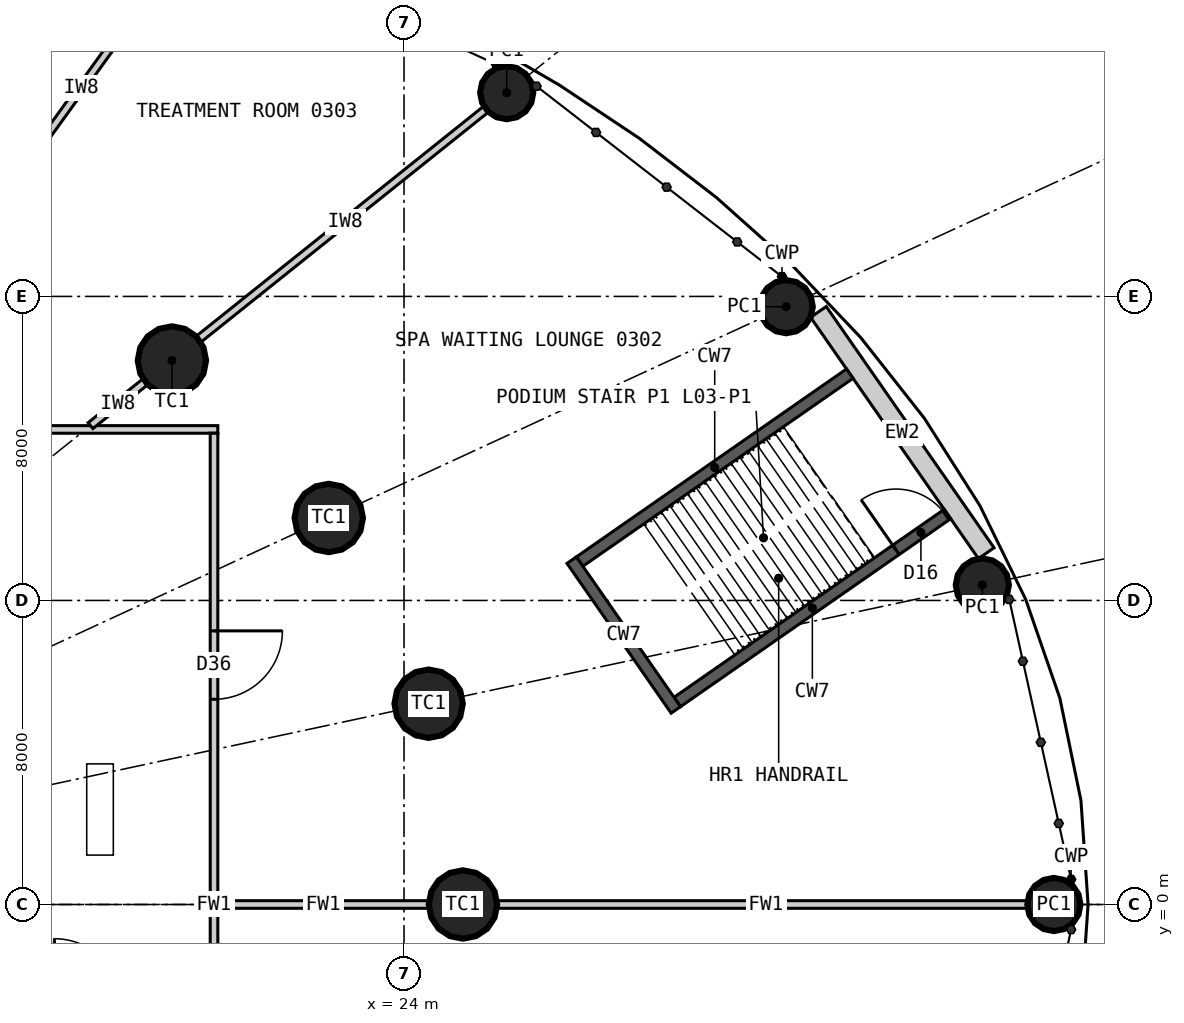
"""IFC4 building model, lengths in metres.
Left out: names, types, materials, properties, quantities, classifications, styles, units other than length and angle.
Written with IfcOpenShell. Run it as: python <this file> out.ifc"""

import sys

from ifc_helpers import new_model, si_unit, direction, frame, frame_2d, origin, origin_2d, place, context, subcontext, project, spatial, rectangle, circle, extrude, element, fill, save


model = new_model("IFC4")
c1 = context("Model", 3, precision=1e-05, world=origin(), true_north=direction((0.0, 1.0)))
c2 = subcontext(c1, "Body", "Model", "MODEL_VIEW")
j1 = project(units=[si_unit("LENGTHUNIT", "METRE"), si_unit("PLANEANGLEUNIT", "RADIAN")], contexts=[c1])
p1 = place(None, origin())
s1 = spatial("IfcSite", under=j1, at=p1, CompositionType="ELEMENT")
p2 = place(p1, origin())
s2 = spatial("IfcBuilding", under=s1, at=p2, CompositionType="ELEMENT")
p3 = place(p2, frame((0.0, 0.0, 19.2)))
s3 = spatial("IfcBuildingStorey", under=s2, at=p3, CompositionType="ELEMENT", Elevation=19.2)
for number, where, z_axis, x_axis in (
    (1, (25.55, 0.0, 0.0), (0.0, 0.0, 1.0), (1.0, 0.0, 0.0)),
    (2, (24.647, 5.283, 0.0), (0.0, 0.0, 1.0), (1.0, 0.0, 0.0)),
    (3, (22.019, 10.17, 0.0), (0.0, 0.0, 1.0), (1.0, 0.0, 0.0)),
    (4, (17.892, 14.313, 0.0), (0.0, 0.0, 1.0), (1.0, 0.0, 0.0)),
):
    element("IfcColumn", number, at=place(p3, frame(where, z_axis=z_axis, x_axis=x_axis)), inside=s3, PredefinedType="COLUMN", context=c2, shape_type="SweptSolid", body=[
        extrude(circle(Radius=0.9, at=origin_2d()), origin(), (0.0, 0.0, 1.0), 5.4),
    ])
for number, where, z_axis, x_axis in (
    (5, (41.1, 0.0, 0.0), (0.0, 0.0, 1.0), (1.0, 0.0, 0.0)),
    (6, (39.218, 8.407, 0.0), (0.0, 0.0, 1.0), (1.0, 0.0, 0.0)),
    (7, (34.057, 15.73, 0.0), (0.0, 0.0, 1.0), (1.0, 0.0, 0.0)),
    (8, (26.702, 21.362, 0.0), (0.0, 0.0, 1.0), (1.0, 0.0, 0.0)),
):
    element("IfcColumn", number, at=place(p3, frame(where, z_axis=z_axis, x_axis=x_axis)), inside=s3, PredefinedType="COLUMN", context=c2, shape_type="SweptSolid", body=[
        extrude(circle(Radius=0.7, at=origin_2d()), origin(), (0.0, 0.0, 1.0), 5.4),
    ])
p4 = place(p3, frame((39.32, 9.244, 0.0), z_axis=(0.0, 0.0, 1.0), x_axis=(-0.571029335057, 0.820929655028, 0.0)))
e9 = element("IfcWall", 9, at=p4, inside=s3, PredefinedType="SOLIDWALL", context=c2, shape_type="SweptSolid", body=[
    extrude(rectangle(XDim=7.733, YDim=0.5, at=frame_2d((3.866, 0.0))), origin(), (0.0, 0.0, 1.0), 5.15),
])
p5 = place(p3, frame((-19.1, 12.5, 0.0), z_axis=(0.0, 0.0, 1.0), x_axis=(1.0, 0.0, 0.0)))
e10 = element("IfcWall", 10, at=p5, inside=s3, PredefinedType="PARTITIONING", context=c2, shape_type="SweptSolid", body=[
    extrude(rectangle(XDim=38.2, YDim=0.2, at=frame_2d((19.1, 0.0))), origin(), (0.0, 0.0, 1.0), 5.15),
])
p6 = place(p5, frame((31.022, 0.0, 0.0)))
e11 = element("IfcOpeningElement", 11, at=p6, cuts=e10, PredefinedType="OPENING", context=c2, shape_type="SweptSolid", body=[
    extrude(rectangle(XDim=1.0, YDim=2.2, at=frame_2d((0.5, 1.1))), frame((0.0, 0.11, 0.0), z_axis=(0.0, -1.0, 0.0), x_axis=(1.0, 0.0, 0.0)), (0.0, 0.0, 1.0), 0.22),
])
p7 = place(p5, frame((25.257, 0.0, 0.0)))
e12 = element("IfcOpeningElement", 12, at=p7, cuts=e10, PredefinedType="OPENING", context=c2, shape_type="SweptSolid", body=[
    extrude(rectangle(XDim=1.0, YDim=2.2, at=frame_2d((0.5, 1.1))), frame((0.0, 0.11, 0.0), z_axis=(0.0, -1.0, 0.0), x_axis=(1.0, 0.0, 0.0)), (0.0, 0.0, 1.0), 0.22),
])
p8 = place(p5, frame((20.71, 0.0, 0.0)))
e13 = element("IfcOpeningElement", 13, at=p8, cuts=e10, PredefinedType="OPENING", context=c2, shape_type="SweptSolid", body=[
    extrude(rectangle(XDim=1.0, YDim=2.1, at=frame_2d((0.5, 1.05))), frame((0.0, 0.11, 0.0), z_axis=(0.0, -1.0, 0.0), x_axis=(1.0, 0.0, 0.0)), (0.0, 0.0, 1.0), 0.22),
])
p9 = place(p5, frame((16.49, 0.0, 0.0)))
e14 = element("IfcOpeningElement", 14, at=p9, cuts=e10, PredefinedType="OPENING", context=c2, shape_type="SweptSolid", body=[
    extrude(rectangle(XDim=1.0, YDim=2.1, at=frame_2d((0.5, 1.05))), frame((0.0, 0.11, 0.0), z_axis=(0.0, -1.0, 0.0), x_axis=(1.0, 0.0, 0.0)), (0.0, 0.0, 1.0), 0.22),
])
p10 = place(p5, frame((11.943, 0.0, 0.0)))
e15 = element("IfcOpeningElement", 15, at=p10, cuts=e10, PredefinedType="OPENING", context=c2, shape_type="SweptSolid", body=[
    extrude(rectangle(XDim=1.0, YDim=2.2, at=frame_2d((0.5, 1.1))), frame((0.0, 0.11, 0.0), z_axis=(0.0, -1.0, 0.0), x_axis=(1.0, 0.0, 0.0)), (0.0, 0.0, 1.0), 0.22),
])
p11 = place(p5, frame((6.178, 0.0, 0.0)))
e16 = element("IfcOpeningElement", 16, at=p11, cuts=e10, PredefinedType="OPENING", context=c2, shape_type="SweptSolid", body=[
    extrude(rectangle(XDim=1.0, YDim=2.2, at=frame_2d((0.5, 1.1))), frame((0.0, 0.11, 0.0), z_axis=(0.0, -1.0, 0.0), x_axis=(1.0, 0.0, 0.0)), (0.0, 0.0, 1.0), 0.22),
])
p12 = place(p3, frame((19.0, -12.4, 0.0), z_axis=(0.0, 0.0, 1.0), x_axis=(0.0, 1.0, 0.0)))
e17 = element("IfcWall", 17, at=p12, inside=s3, PredefinedType="PARTITIONING", context=c2, shape_type="SweptSolid", body=[
    extrude(rectangle(XDim=24.8, YDim=0.2, at=frame_2d((12.4, 0.0))), origin(), (0.0, 0.0, 1.0), 5.15),
])
p13 = place(p12, frame((17.8, 0.0, 0.0)))
e18 = element("IfcOpeningElement", 18, at=p13, cuts=e17, PredefinedType="OPENING", context=c2, shape_type="SweptSolid", body=[
    extrude(rectangle(XDim=1.8, YDim=2.4, at=frame_2d((0.9, 1.2))), frame((0.0, 0.11, 0.0), z_axis=(0.0, -1.0, 0.0), x_axis=(1.0, 0.0, 0.0)), (0.0, 0.0, 1.0), 0.22),
])
p14 = place(p3, frame((19.1, 0.0, 0.0), z_axis=(0.0, 0.0, 1.0), x_axis=(1.0, 0.0, 0.0)))
e19 = element("IfcWall", 19, at=p14, inside=s3, PredefinedType="PARTITIONING", context=c2, shape_type="SweptSolid", body=[
    extrude(rectangle(XDim=5.55, YDim=0.2, at=frame_2d((2.775, 0.0))), origin(), (0.0, 0.0, 1.0), 4.25),
])
p15 = place(p3, frame((26.45, 0.0, 0.0), z_axis=(0.0, 0.0, 1.0), x_axis=(1.0, 0.0, 0.0)))
e20 = element("IfcWall", 20, at=p15, inside=s3, PredefinedType="PARTITIONING", context=c2, shape_type="SweptSolid", body=[
    extrude(rectangle(XDim=14.15, YDim=0.2, at=frame_2d((7.075, 0.0))), origin(), (0.0, 0.0, 1.0), 4.25),
])
p16 = place(p3, frame((15.75, 12.6, 0.0), z_axis=(0.0, 0.0, 1.0), x_axis=(0.780881734892, 0.6246788904, 0.0)))
e21 = element("IfcWall", 21, at=p16, inside=s3, PredefinedType="PARTITIONING", context=c2, shape_type="SweptSolid", body=[
    extrude(rectangle(XDim=1.843, YDim=0.2, at=frame_2d((0.921, 0.0))), origin(), (0.0, 0.0, 1.0), 4.3),
])
p17 = place(p3, frame((18.594, 14.875, 0.0), z_axis=(0.0, 0.0, 1.0), x_axis=(0.780868809443, 0.624695047554, 0.0)))
e22 = element("IfcWall", 22, at=p17, inside=s3, PredefinedType="PARTITIONING", context=c2, shape_type="SweptSolid", body=[
    extrude(rectangle(XDim=9.883, YDim=0.2, at=frame_2d((4.941, 0.0))), origin(), (0.0, 0.0, 1.0), 4.25),
])
p18 = place(p3, frame((13.118, 18.176, 0.0), z_axis=(0.0, 0.0, 1.0), x_axis=(0.585204349301, 0.810885854828, 0.0)))
e23 = element("IfcWall", 23, at=p18, inside=s3, PredefinedType="PARTITIONING", context=c2, shape_type="SweptSolid", body=[
    extrude(rectangle(XDim=8.161, YDim=0.2, at=frame_2d((4.081, 0.0))), origin(), (0.0, 0.0, 1.0), 4.25),
])
p19 = place(p3, frame((38.299, 10.274, 0.0), z_axis=(0.0, 0.0, 1.0), x_axis=(-0.820936803751, -0.571019057692, 0.0)))
e24 = element("IfcWall", 24, at=p19, inside=s3, PredefinedType="SHEAR", context=c2, shape_type="SweptSolid", body=[
    extrude(rectangle(XDim=8.66, YDim=0.3, at=frame_2d((4.33, 0.0))), origin(), (0.0, 0.0, 1.0), 5.4),
])
p20 = place(p19, frame((0.05, 0.0, 0.0)))
e25 = element("IfcOpeningElement", 25, at=p20, cuts=e24, PredefinedType="OPENING", context=c2, shape_type="SweptSolid", body=[
    extrude(rectangle(XDim=1.6, YDim=2.1, at=frame_2d((0.8, 1.05))), frame((0.0, 0.16, 0.0), z_axis=(0.0, -1.0, 0.0), x_axis=(1.0, 0.0, 0.0)), (0.0, 0.0, 1.0), 0.32),
])
p21 = place(p3, frame((35.729, 13.968, 0.0), z_axis=(0.0, 0.0, 1.0), x_axis=(-0.82092761123, -0.571032273274, 0.0)))
e26 = element("IfcWall", 26, at=p21, inside=s3, PredefinedType="SHEAR", context=c2, shape_type="SweptSolid", body=[
    extrude(rectangle(XDim=8.66, YDim=0.3, at=frame_2d((4.33, 0.0))), origin(), (0.0, 0.0, 1.0), 5.4),
])
p22 = place(p3, frame((31.153, 5.12, 0.0), z_axis=(0.0, 0.0, 1.0), x_axis=(-0.571036173178, 0.820924898467, 0.0)))
e27 = element("IfcWall", 27, at=p22, inside=s3, PredefinedType="SHEAR", context=c2, shape_type="SweptSolid", body=[
    extrude(rectangle(XDim=4.8, YDim=0.3, at=frame_2d((2.4, 0.0))), origin(), (0.0, 0.0, 1.0), 5.4),
])
p23 = place(p20, origin())
e28 = element("IfcDoor", 28, at=p23, inside=s3, OperationType="SINGLE_SWING_RIGHT", PredefinedType="DOOR", context=c2, shape_type="SweptSolid", body=[
    extrude(rectangle(XDim=1.6, YDim=2.1, at=frame_2d((0.8, 1.05))), frame((0.0, 0.025, 0.0), z_axis=(0.0, -1.0, 0.0), x_axis=(1.0, 0.0, 0.0)), (0.0, 0.0, 1.0), 0.05),
])
fill(e25, e28)
p24 = place(p13, origin())
e29 = element("IfcDoor", 29, at=p24, inside=s3, OperationType="DOUBLE_DOOR_DOUBLE_SWING", PredefinedType="DOOR", context=c2, shape_type="SweptSolid", body=[
    extrude(rectangle(XDim=1.8, YDim=2.4, at=frame_2d((0.9, 1.2))), frame((0.0, 0.025, 0.0), z_axis=(0.0, -1.0, 0.0), x_axis=(1.0, 0.0, 0.0)), (0.0, 0.0, 1.0), 0.05),
])
fill(e18, e29)
save(model, sys.argv[1])
